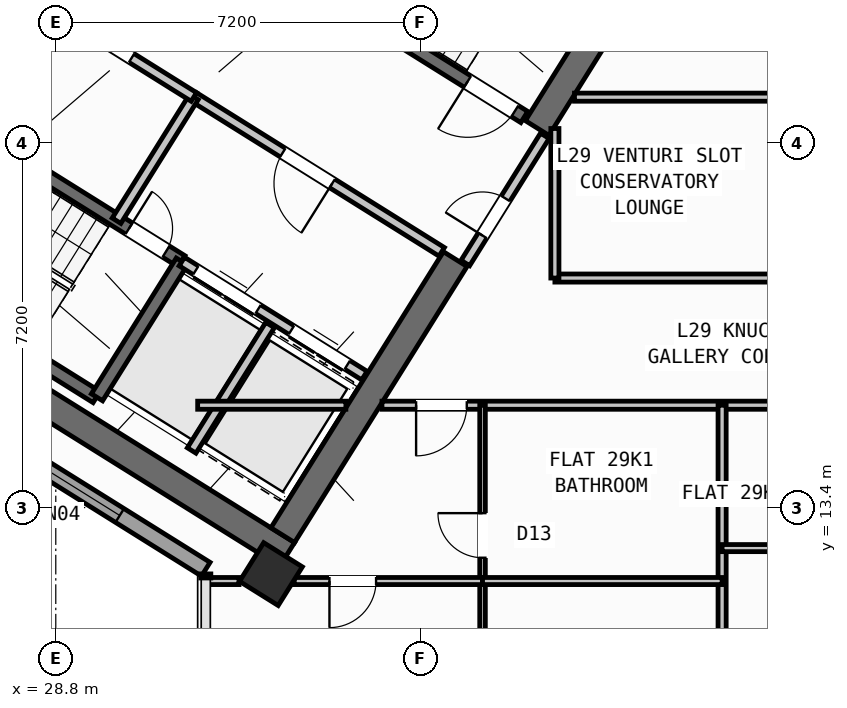
"""IFC4 building model, lengths in metres.
Left out: names, types, materials, properties, quantities, classifications, styles, units other than length and angle.
Written with IfcOpenShell. Run it as: python <this file> out.ifc"""

import sys

from ifc_helpers import new_model, si_unit, direction, frame, frame_2d, origin, origin_2d, place, context, subcontext, project, spatial, rectangle, hollow_rectangle, extrude, source, transform, mapped, element, fill, save


model = new_model("IFC4")
c1 = context("Model", 3, precision=1e-05, world=origin(), true_north=direction((0.0, 1.0)))
c2 = subcontext(c1, "Body", "Model", "MODEL_VIEW")
j1 = project(units=[si_unit("LENGTHUNIT", "METRE"), si_unit("PLANEANGLEUNIT", "RADIAN")], contexts=[c1])
p1 = place(None, origin())
s1 = spatial("IfcSite", under=j1, at=p1, CompositionType="ELEMENT")
p2 = place(p1, origin())
s2 = spatial("IfcBuilding", under=s1, at=p2, CompositionType="ELEMENT")
p3 = place(p2, frame((0.0, 0.0, 116.1)))
s3 = spatial("IfcBuildingStorey", under=s2, at=p3, CompositionType="ELEMENT", Elevation=116.1)
p4 = place(p3, frame((33.366, 12.477, 0.0), z_axis=(0.0, 0.0, 1.0), x_axis=(-0.848047359947, 0.529920442413, 0.0)))
e1 = element("IfcWall", 1, at=p4, inside=s3, PredefinedType="SHEAR", context=c2, shape_type="SweptSolid", body=[
    extrude(rectangle(XDim=13.14, YDim=0.55, at=frame_2d((6.57, 0.0))), origin(), (0.0, 0.0, 1.0), 3.35),
])
p5 = place(p3, frame((40.194, 23.922, 0.0), z_axis=(0.0, 0.0, 1.0), x_axis=(-0.529888438328, -0.848067357541, 0.0)))
e2 = element("IfcWall", 2, at=p5, inside=s3, PredefinedType="SHEAR", context=c2, shape_type="SweptSolid", body=[
    extrude(rectangle(XDim=3.575, YDim=0.55, at=frame_2d((1.788, 0.0))), origin(), (0.0, 0.0, 1.0), 3.35),
])
p6 = place(p3, frame((36.683, 18.304, 0.0), z_axis=(0.0, 0.0, 1.0), x_axis=(-0.529896466841, -0.848062341122, 0.0)))
e3 = element("IfcWall", 3, at=p6, inside=s3, PredefinedType="SHEAR", context=c2, shape_type="SweptSolid", body=[
    extrude(rectangle(XDim=6.425, YDim=0.55, at=frame_2d((3.212, 0.0))), origin(), (0.0, 0.0, 1.0), 3.35),
])
m1 = source(origin(), c2, "Body", "SweptSolid", [
    extrude(hollow_rectangle(XDim=0.9, YDim=0.9, WallThickness=0.036, at=origin_2d()), origin(), (0.0, 0.0, 1.0), 3.6),
])
p7 = place(p3, frame((33.046, 12.087, 0.0), z_axis=(0.0, 0.0, 1.0), x_axis=(-0.848048096156, 0.529919264233, 0.0)))
e4 = element("IfcColumn", 4, at=p7, inside=s3, PredefinedType="COLUMN", context=c2, shape_type="MappedRepresentation", body=[
    mapped(m1, transform((0.0, 0.0, 0.0), scale=1.0)),
])
p8 = place(p3, frame((31.76, 12.183, 0.0), z_axis=(0.0, 0.0, 1.0), x_axis=(-0.848047074256, 0.529920899612, 0.0)))
e5 = element("IfcWall", 5, at=p8, inside=s3, PredefinedType="STANDARD", context=c2, shape_type="SweptSolid", body=[
    extrude(rectangle(XDim=30.652, YDim=0.32, at=frame_2d((15.326, 0.0))), origin(), (0.0, 0.0, 1.0), 3.35),
])
p9 = place(p8, frame((15.153, 0.0, 0.0)))
e6 = element("IfcOpeningElement", 6, at=p9, cuts=e5, PredefinedType="OPENING", context=c2, shape_type="SweptSolid", body=[
    extrude(rectangle(XDim=1.2, YDim=2.15, at=frame_2d((0.6, 1.075))), frame((0.0, 0.17, 0.0), z_axis=(0.0, -1.0, 0.0), x_axis=(1.0, 0.0, 0.0)), (0.0, 0.0, 1.0), 0.34),
])
p10 = place(p8, frame((2.002, 0.0, 0.8)))
e7 = element("IfcOpeningElement", 7, at=p10, cuts=e5, PredefinedType="OPENING", context=c2, shape_type="SweptSolid", body=[
    extrude(rectangle(XDim=2.1, YDim=1.55, at=frame_2d((1.05, 0.775))), frame((0.0, 0.17, 0.0), z_axis=(0.0, -1.0, 0.0), x_axis=(1.0, 0.0, 0.0)), (0.0, 0.0, 1.0), 0.34),
])
p11 = place(p8, frame((7.206, 0.0, 0.8)))
e8 = element("IfcOpeningElement", 8, at=p11, cuts=e5, PredefinedType="OPENING", context=c2, shape_type="SweptSolid", body=[
    extrude(rectangle(XDim=2.1, YDim=1.55, at=frame_2d((1.05, 0.775))), frame((0.0, 0.17, 0.0), z_axis=(0.0, -1.0, 0.0), x_axis=(1.0, 0.0, 0.0)), (0.0, 0.0, 1.0), 0.34),
])
p12 = place(p8, frame((12.648, 0.0, 1.0)))
e9 = element("IfcOpeningElement", 9, at=p12, cuts=e5, PredefinedType="OPENING", context=c2, shape_type="SweptSolid", body=[
    extrude(rectangle(XDim=0.9, YDim=1.25, at=frame_2d((0.45, 0.625))), frame((0.0, 0.17, 0.0), z_axis=(0.0, -1.0, 0.0), x_axis=(1.0, 0.0, 0.0)), (0.0, 0.0, 1.0), 0.34),
])
p13 = place(p8, frame((19.458, 0.0, 0.95)))
e10 = element("IfcOpeningElement", 10, at=p13, cuts=e5, PredefinedType="OPENING", context=c2, shape_type="SweptSolid", body=[
    extrude(rectangle(XDim=1.2, YDim=1.4, at=frame_2d((0.6, 0.7))), frame((0.0, 0.17, 0.0), z_axis=(0.0, -1.0, 0.0), x_axis=(1.0, 0.0, 0.0)), (0.0, 0.0, 1.0), 0.34),
])
p14 = place(p8, frame((21.858, 0.0, 0.95)))
e11 = element("IfcOpeningElement", 11, at=p14, cuts=e5, PredefinedType="OPENING", context=c2, shape_type="SweptSolid", body=[
    extrude(rectangle(XDim=1.2, YDim=1.4, at=frame_2d((0.6, 0.7))), frame((0.0, 0.17, 0.0), z_axis=(0.0, -1.0, 0.0), x_axis=(1.0, 0.0, 0.0)), (0.0, 0.0, 1.0), 0.34),
])
p15 = place(p8, frame((27.266, 0.0, 0.8)))
e12 = element("IfcOpeningElement", 12, at=p15, cuts=e5, PredefinedType="OPENING", context=c2, shape_type="SweptSolid", body=[
    extrude(rectangle(XDim=2.1, YDim=1.55, at=frame_2d((1.05, 0.775))), frame((0.0, 0.17, 0.0), z_axis=(0.0, -1.0, 0.0), x_axis=(1.0, 0.0, 0.0)), (0.0, 0.0, 1.0), 0.34),
])
p16 = place(p3, frame((29.605, 15.581, 0.0), z_axis=(0.0, 0.0, 1.0), x_axis=(-0.848036911448, 0.529937163087, 0.0)))
e13 = element("IfcWall", 13, at=p16, inside=s3, PredefinedType="SHEAR", context=c2, shape_type="SweptSolid", body=[
    extrude(rectangle(XDim=7.46, YDim=0.26, at=frame_2d((3.73, 0.0))), origin(), (0.0, 0.0, 1.0), 3.35),
])
p17 = place(p3, frame((31.28, 18.261, 0.0), z_axis=(0.0, 0.0, 1.0), x_axis=(-0.848051618787, 0.529913626805, 0.0)))
e14 = element("IfcWall", 14, at=p17, inside=s3, PredefinedType="SHEAR", context=c2, shape_type="SweptSolid", body=[
    extrude(rectangle(XDim=7.46, YDim=0.26, at=frame_2d((3.73, 0.0))), origin(), (0.0, 0.0, 1.0), 3.35),
])
p18 = place(p17, frame((0.36, 0.0, 0.0)))
e15 = element("IfcOpeningElement", 15, at=p18, cuts=e14, PredefinedType="OPENING", context=c2, shape_type="SweptSolid", body=[
    extrude(rectangle(XDim=0.86, YDim=2.05, at=frame_2d((0.43, 1.025))), frame((0.0, 0.14, 0.0), z_axis=(0.0, -1.0, 0.0), x_axis=(1.0, 0.0, 0.0)), (0.0, 0.0, 1.0), 0.28),
])
p19 = place(p3, frame((31.288, 18.256, 0.0), z_axis=(0.0, 0.0, 1.0), x_axis=(-0.529943379326, -0.848033026897, 0.0)))
e16 = element("IfcWall", 16, at=p19, inside=s3, PredefinedType="SHEAR", context=c2, shape_type="SweptSolid", body=[
    extrude(rectangle(XDim=3.16, YDim=0.26, at=frame_2d((1.58, 0.0))), origin(), (0.0, 0.0, 1.0), 3.35),
])
p20 = place(p3, frame((38.046, 21.108, 0.0), z_axis=(0.0, 0.0, 1.0), x_axis=(-0.848054434086, 0.529909121291, 0.0)))
e17 = element("IfcWall", 17, at=p20, inside=s3, PredefinedType="SHEAR", context=c2, shape_type="SweptSolid", body=[
    extrude(rectangle(XDim=7.33, YDim=0.26, at=frame_2d((3.665, 0.0))), origin(), (0.0, 0.0, 1.0), 3.35),
])
p21 = place(p20, frame((0.22, 0.0, 0.0)))
e18 = element("IfcOpeningElement", 18, at=p21, cuts=e17, PredefinedType="OPENING", context=c2, shape_type="SweptSolid", body=[
    extrude(rectangle(XDim=1.1, YDim=2.1, at=frame_2d((0.55, 1.05))), frame((0.0, 0.14, 0.0), z_axis=(0.0, -1.0, 0.0), x_axis=(1.0, 0.0, 0.0)), (0.0, 0.0, 1.0), 0.28),
])
p22 = place(p3, frame((34.891, 16.005, 0.0), z_axis=(0.0, 0.0, 1.0), x_axis=(-0.848062873452, 0.529895614884, 0.0)))
e19 = element("IfcWall", 19, at=p22, inside=s3, PredefinedType="STANDARD", context=c2, shape_type="SweptSolid", body=[
    extrude(rectangle(XDim=4.248, YDim=0.2, at=frame_2d((2.124, 0.0))), origin(), (0.0, 0.0, 1.0), 3.34),
])
p23 = place(p22, frame((0.398, 0.0, 0.0)))
e20 = element("IfcOpeningElement", 20, at=p23, cuts=e19, PredefinedType="OPENING", context=c2, shape_type="SweptSolid", body=[
    extrude(rectangle(XDim=1.3, YDim=2.2, at=frame_2d((0.65, 1.1))), frame((0.0, 0.11, 0.0), z_axis=(0.0, -1.0, 0.0), x_axis=(1.0, 0.0, 0.0)), (0.0, 0.0, 1.0), 0.22),
])
p24 = place(p22, frame((2.473, 0.0, 0.0)))
e21 = element("IfcOpeningElement", 21, at=p24, cuts=e19, PredefinedType="OPENING", context=c2, shape_type="SweptSolid", body=[
    extrude(rectangle(XDim=1.45, YDim=2.25, at=frame_2d((0.725, 1.125))), frame((0.0, 0.11, 0.0), z_axis=(0.0, -1.0, 0.0), x_axis=(1.0, 0.0, 0.0)), (0.0, 0.0, 1.0), 0.22),
])
p25 = place(p3, frame((36.417, 18.447, 0.0), z_axis=(0.0, 0.0, 1.0), x_axis=(-0.848064879198, 0.529892404805, 0.0)))
e22 = element("IfcWall", 22, at=p25, inside=s3, PredefinedType="STANDARD", context=c2, shape_type="SweptSolid", body=[
    extrude(rectangle(XDim=5.768, YDim=0.2, at=frame_2d((2.884, 0.0))), origin(), (0.0, 0.0, 1.0), 3.34),
])
p26 = place(p25, frame((2.548, 0.0, 0.0)))
e23 = element("IfcOpeningElement", 23, at=p26, cuts=e22, PredefinedType="OPENING", context=c2, shape_type="SweptSolid", body=[
    extrude(rectangle(XDim=1.15, YDim=2.1, at=frame_2d((0.575, 1.05))), frame((0.0, 0.11, 0.0), z_axis=(0.0, -1.0, 0.0), x_axis=(1.0, 0.0, 0.0)), (0.0, 0.0, 1.0), 0.22),
])
p27 = place(p3, frame((33.029, 17.003, 0.0), z_axis=(0.0, 0.0, 1.0), x_axis=(-0.529916267533, -0.848049968695, 0.0)))
e24 = element("IfcWall", 24, at=p27, inside=s3, PredefinedType="STANDARD", context=c2, shape_type="SweptSolid", body=[
    extrude(rectangle(XDim=2.92, YDim=0.2, at=frame_2d((1.46, 0.0))), origin(), (0.0, 0.0, 1.0), 3.34),
])
for number, where, z_axis, x_axis in (
    (25, (31.525, 21.504, 0.0), (0.0, 0.0, 1.0), (-0.53, -0.848, 0.0)),
    (26, (28.71, 23.263, 0.0), (0.0, 0.0, 1.0), (-0.53, -0.848, 0.0)),
):
    element("IfcWall", number, at=place(p3, frame(where, z_axis=z_axis, x_axis=x_axis)), inside=s3, PredefinedType="STANDARD", context=c2, shape_type="SweptSolid", body=[
        extrude(rectangle(XDim=2.88, YDim=0.2, at=frame_2d((1.44, 0.0))), origin(), (0.0, 0.0, 1.0), 3.34),
    ])
p28 = place(p3, frame((31.525, 21.504, 0.0), z_axis=(0.0, 0.0, 1.0), x_axis=(-0.848040211232, 0.529931882541, 0.0)))
e27 = element("IfcWall", 27, at=p28, inside=s3, PredefinedType="STANDARD", context=c2, shape_type="SweptSolid", body=[
    extrude(rectangle(XDim=6.218, YDim=0.2, at=frame_2d((3.109, 0.0))), origin(), (0.0, 0.0, 1.0), 3.34),
])
p29 = place(p28, frame((4.4, 0.0, 0.0)))
e28 = element("IfcOpeningElement", 28, at=p29, cuts=e27, PredefinedType="OPENING", context=c2, shape_type="SweptSolid", body=[
    extrude(rectangle(XDim=0.86, YDim=2.05, at=frame_2d((0.43, 1.025))), frame((0.0, 0.11, 0.0), z_axis=(0.0, -1.0, 0.0), x_axis=(1.0, 0.0, 0.0)), (0.0, 0.0, 1.0), 0.22),
])
p30 = place(p28, frame((1.45, 0.0, 0.0)))
e29 = element("IfcOpeningElement", 29, at=p30, cuts=e27, PredefinedType="OPENING", context=c2, shape_type="SweptSolid", body=[
    extrude(rectangle(XDim=0.86, YDim=2.05, at=frame_2d((0.43, 1.025))), frame((0.0, 0.11, 0.0), z_axis=(0.0, -1.0, 0.0), x_axis=(1.0, 0.0, 0.0)), (0.0, 0.0, 1.0), 0.22),
])
p31 = place(p3, frame((38.451, 20.737, 0.0), z_axis=(0.0, 0.0, 1.0), x_axis=(-0.529924799939, -0.848044637038, 0.0)))
e30 = element("IfcWall", 30, at=p31, inside=s3, PredefinedType="STANDARD", context=c2, shape_type="SweptSolid", body=[
    extrude(rectangle(XDim=2.96, YDim=0.2, at=frame_2d((1.48, 0.0))), origin(), (0.0, 0.0, 1.0), 3.34),
])
p32 = place(p31, frame((1.46, 0.0, 0.0)))
e31 = element("IfcOpeningElement", 31, at=p32, cuts=e30, PredefinedType="OPENING", context=c2, shape_type="SweptSolid", body=[
    extrude(rectangle(XDim=0.86, YDim=2.05, at=frame_2d((0.43, 1.025))), frame((0.0, 0.11, 0.0), z_axis=(0.0, -1.0, 0.0), x_axis=(1.0, 0.0, 0.0)), (0.0, 0.0, 1.0), 0.22),
])
p33 = place(p3, frame((31.6, 15.42, 0.0), z_axis=(0.0, 0.0, 1.0), x_axis=(1.0, 0.0, 0.0)))
e32 = element("IfcWall", 32, at=p33, inside=s3, PredefinedType="PARTITIONING", context=c2, shape_type="SweptSolid", body=[
    extrude(rectangle(XDim=2.925, YDim=0.16, at=frame_2d((1.462, 0.0))), origin(), (0.0, 0.0, 1.0), 3.34),
])
p34 = place(p3, frame((35.237, 15.42, 0.0), z_axis=(0.0, 0.0, 1.0), x_axis=(1.0, 0.0, 0.0)))
e33 = element("IfcWall", 33, at=p34, inside=s3, PredefinedType="PARTITIONING", context=c2, shape_type="SweptSolid", body=[
    extrude(rectangle(XDim=15.432, YDim=0.16, at=frame_2d((7.716, 0.0))), origin(), (0.0, 0.0, 1.0), 3.34),
])
p35 = place(p34, frame((0.674, 0.0, 0.0)))
e34 = element("IfcOpeningElement", 34, at=p35, cuts=e33, PredefinedType="OPENING", context=c2, shape_type="SweptSolid", body=[
    extrude(rectangle(XDim=1.0, YDim=2.1, at=frame_2d((0.5, 1.05))), frame((0.0, 0.09, 0.0), z_axis=(0.0, -1.0, 0.0), x_axis=(1.0, 0.0, 0.0)), (0.0, 0.0, 1.0), 0.18),
])
p36 = place(p34, frame((9.094, 0.0, 0.0)))
e35 = element("IfcOpeningElement", 35, at=p36, cuts=e33, PredefinedType="OPENING", context=c2, shape_type="SweptSolid", body=[
    extrude(rectangle(XDim=1.0, YDim=2.1, at=frame_2d((0.5, 1.05))), frame((0.0, 0.09, 0.0), z_axis=(0.0, -1.0, 0.0), x_axis=(1.0, 0.0, 0.0)), (0.0, 0.0, 1.0), 0.18),
])
p37 = place(p3, frame((38.65, 17.93, 0.0), z_axis=(0.0, 0.0, 1.0), x_axis=(1.0, 0.0, 0.0)))
e36 = element("IfcWall", 36, at=p37, inside=s3, PredefinedType="PARTITIONING", context=c2, shape_type="SweptSolid", body=[
    extrude(rectangle(XDim=9.95, YDim=0.16, at=frame_2d((4.975, 0.0))), origin(), (0.0, 0.0, 1.0), 3.34),
])
p38 = place(p37, frame((4.475, 0.0, 0.0)))
e37 = element("IfcOpeningElement", 37, at=p38, cuts=e36, PredefinedType="OPENING", context=c2, shape_type="SweptSolid", body=[
    extrude(rectangle(XDim=1.0, YDim=2.1, at=frame_2d((0.5, 1.05))), frame((0.0, 0.09, 0.0), z_axis=(0.0, -1.0, 0.0), x_axis=(1.0, 0.0, 0.0)), (0.0, 0.0, 1.0), 0.18),
])
p39 = place(p3, frame((38.65, 17.93, 0.0), z_axis=(0.0, 0.0, 1.0), x_axis=(0.0, 1.0, 0.0)))
e38 = element("IfcWall", 38, at=p39, inside=s3, PredefinedType="PARTITIONING", context=c2, shape_type="SweptSolid", body=[
    extrude(rectangle(XDim=2.951, YDim=0.16, at=frame_2d((1.476, 0.0))), origin(), (0.0, 0.0, 1.0), 3.34),
])
p40 = place(p3, frame((39.037, 21.5, 0.0), z_axis=(0.0, 0.0, 1.0), x_axis=(1.0, 0.0, 0.0)))
e39 = element("IfcWall", 39, at=p40, inside=s3, PredefinedType="PARTITIONING", context=c2, shape_type="SweptSolid", body=[
    extrude(rectangle(XDim=7.215, YDim=0.16, at=frame_2d((3.607, 0.0))), origin(), (0.0, 0.0, 1.0), 3.34),
])
p41 = place(p3, frame((41.95, 1.96, 0.0), z_axis=(0.0, 0.0, 1.0), x_axis=(0.0, 1.0, 0.0)))
e40 = element("IfcWall", 40, at=p41, inside=s3, PredefinedType="PARTITIONING", context=c2, shape_type="SweptSolid", body=[
    extrude(rectangle(XDim=13.46, YDim=0.16, at=frame_2d((6.73, 0.0))), origin(), (0.0, 0.0, 1.0), 3.34),
])
p42 = place(p3, frame((37.222, 1.96, 0.0), z_axis=(0.0, 0.0, 1.0), x_axis=(0.0, 1.0, 0.0)))
e41 = element("IfcWall", 41, at=p42, inside=s3, PredefinedType="PARTITIONING", context=c2, shape_type="SweptSolid", body=[
    extrude(rectangle(XDim=13.46, YDim=0.11, at=frame_2d((6.73, 0.0))), origin(), (0.0, 0.0, 1.0), 3.34),
])
p43 = place(p42, frame((5.2, 0.0, 0.0)))
e42 = element("IfcOpeningElement", 42, at=p43, cuts=e41, PredefinedType="OPENING", context=c2, shape_type="SweptSolid", body=[
    extrude(rectangle(XDim=0.92, YDim=2.08, at=frame_2d((0.46, 1.04))), frame((0.0, 0.065, 0.0), z_axis=(0.0, -1.0, 0.0), x_axis=(1.0, 0.0, 0.0)), (0.0, 0.0, 1.0), 0.13),
])
p44 = place(p42, frame((10.45, 0.0, 0.0)))
e43 = element("IfcOpeningElement", 43, at=p44, cuts=e41, PredefinedType="OPENING", context=c2, shape_type="SweptSolid", body=[
    extrude(rectangle(XDim=0.88, YDim=2.08, at=frame_2d((0.44, 1.04))), frame((0.0, 0.065, 0.0), z_axis=(0.0, -1.0, 0.0), x_axis=(1.0, 0.0, 0.0)), (0.0, 0.0, 1.0), 0.13),
])
p45 = place(p3, frame((31.74, 11.95, 0.0), z_axis=(0.0, 0.0, 1.0), x_axis=(1.0, 0.0, 0.0)))
e44 = element("IfcWall", 44, at=p45, inside=s3, PredefinedType="PLUMBINGWALL", context=c2, shape_type="SweptSolid", body=[
    extrude(rectangle(XDim=0.676, YDim=0.14, at=frame_2d((0.338, 0.0))), origin(), (0.0, 0.0, 1.0), 3.34),
])
p46 = place(p3, frame((33.505, 11.95, 0.0), z_axis=(0.0, 0.0, 1.0), x_axis=(1.0, 0.0, 0.0)))
e45 = element("IfcWall", 45, at=p46, inside=s3, PredefinedType="PLUMBINGWALL", context=c2, shape_type="SweptSolid", body=[
    extrude(rectangle(XDim=3.717, YDim=0.14, at=frame_2d((1.858, 0.0))), origin(), (0.0, 0.0, 1.0), 2.525),
])
p47 = place(p46, frame((0.696, 0.0, 0.0)))
e46 = element("IfcOpeningElement", 46, at=p47, cuts=e45, PredefinedType="OPENING", context=c2, shape_type="SweptSolid", body=[
    extrude(rectangle(XDim=0.92, YDim=2.08, at=frame_2d((0.46, 1.04))), frame((0.0, 0.08, 0.0), z_axis=(0.0, -1.0, 0.0), x_axis=(1.0, 0.0, 0.0)), (0.0, 0.0, 1.0), 0.16),
])
p48 = place(p3, frame((37.222, 11.95, 0.0), z_axis=(0.0, 0.0, 1.0), x_axis=(1.0, 0.0, 0.0)))
e47 = element("IfcWall", 47, at=p48, inside=s3, PredefinedType="PLUMBINGWALL", context=c2, shape_type="SweptSolid", body=[
    extrude(rectangle(XDim=4.728, YDim=0.14, at=frame_2d((2.364, 0.0))), origin(), (0.0, 0.0, 1.0), 2.525),
])
p49 = place(p3, frame((41.95, 12.6, 0.0), z_axis=(0.0, 0.0, 1.0), x_axis=(1.0, 0.0, 0.0)))
e48 = element("IfcWall", 48, at=p49, inside=s3, PredefinedType="PLUMBINGWALL", context=c2, shape_type="SweptSolid", body=[
    extrude(rectangle(XDim=5.713, YDim=0.14, at=frame_2d((2.856, 0.0))), origin(), (0.0, 0.0, 1.0), 2.525),
])
p50 = place(p49, frame((2.396, 0.0, 0.0)))
e49 = element("IfcOpeningElement", 49, at=p50, cuts=e48, PredefinedType="OPENING", context=c2, shape_type="SweptSolid", body=[
    extrude(rectangle(XDim=0.92, YDim=2.08, at=frame_2d((0.46, 1.04))), frame((0.0, 0.08, 0.0), z_axis=(0.0, -1.0, 0.0), x_axis=(1.0, 0.0, 0.0)), (0.0, 0.0, 1.0), 0.16),
])
m2 = source(origin(), c2, "Body", "SweptSolid", [
    extrude(rectangle(XDim=2.1, YDim=1.55, at=frame_2d((1.05, 0.775))), frame((0.0, 0.03, 0.0), z_axis=(0.0, -1.0, 0.0), x_axis=(1.0, 0.0, 0.0)), (0.0, 0.0, 1.0), 0.06),
])
p51 = place(p10, origin())
e50 = element("IfcWindow", 50, at=p51, inside=s3, PartitioningType="SINGLE_PANEL", PredefinedType="WINDOW", context=c2, shape_type="MappedRepresentation", body=[
    mapped(m2, transform((0.0, 0.0, 0.0), scale=1.0)),
])
fill(e7, e50)
m3 = source(origin(), c2, "Body", "SweptSolid", [
    extrude(rectangle(XDim=0.86, YDim=2.05, at=frame_2d((0.43, 1.025))), frame((0.0, 0.025, 0.0), z_axis=(0.0, -1.0, 0.0), x_axis=(1.0, 0.0, 0.0)), (0.0, 0.0, 1.0), 0.05),
])
p52 = place(p18, frame((0.86, 0.0, 0.0), z_axis=(0.0, 0.0, 1.0), x_axis=(-1.0, 0.0, 0.0)))
e51 = element("IfcDoor", 51, at=p52, inside=s3, OperationType="SINGLE_SWING_LEFT", PredefinedType="DOOR", context=c2, shape_type="MappedRepresentation", body=[
    mapped(m3, transform((0.0, 0.0, 0.0), scale=1.0)),
])
fill(e15, e51)
m4 = source(origin(), c2, "Body", "SweptSolid", [
    extrude(rectangle(XDim=1.1, YDim=2.1, at=frame_2d((0.55, 1.05))), frame((0.0, 0.025, 0.0), z_axis=(0.0, -1.0, 0.0), x_axis=(1.0, 0.0, 0.0)), (0.0, 0.0, 1.0), 0.05),
])
p53 = place(p21, origin())
e52 = element("IfcDoor", 52, at=p53, inside=s3, OperationType="SINGLE_SWING_RIGHT", PredefinedType="DOOR", context=c2, shape_type="MappedRepresentation", body=[
    mapped(m4, transform((0.0, 0.0, 0.0), scale=1.0)),
])
fill(e18, e52)
m5 = source(origin(), c2, "Body", "SweptSolid", [
    extrude(rectangle(XDim=1.15, YDim=2.1, at=frame_2d((0.575, 1.05))), frame((0.0, 0.025, 0.0), z_axis=(0.0, -1.0, 0.0), x_axis=(1.0, 0.0, 0.0)), (0.0, 0.0, 1.0), 0.05),
])
p54 = place(p26, origin())
e53 = element("IfcDoor", 53, at=p54, inside=s3, OperationType="SINGLE_SWING_LEFT", PredefinedType="DOOR", context=c2, shape_type="MappedRepresentation", body=[
    mapped(m5, transform((0.0, 0.0, 0.0), scale=1.0)),
])
fill(e23, e53)
m6 = source(origin(), c2, "Body", "SweptSolid", [
    extrude(rectangle(XDim=1.3, YDim=2.2, at=frame_2d((0.65, 1.1))), frame((0.0, 0.025, 0.0), z_axis=(0.0, -1.0, 0.0), x_axis=(1.0, 0.0, 0.0)), (0.0, 0.0, 1.0), 0.05),
])
p55 = place(p23, origin())
e54 = element("IfcDoor", 54, at=p55, inside=s3, OperationType="DOUBLE_DOOR_SLIDING", PredefinedType="DOOR", context=c2, shape_type="MappedRepresentation", body=[
    mapped(m6, transform((0.0, 0.0, 0.0), scale=1.0)),
])
fill(e20, e54)
m7 = source(origin(), c2, "Body", "SweptSolid", [
    extrude(rectangle(XDim=1.45, YDim=2.25, at=frame_2d((0.725, 1.125))), frame((0.0, 0.025, 0.0), z_axis=(0.0, -1.0, 0.0), x_axis=(1.0, 0.0, 0.0)), (0.0, 0.0, 1.0), 0.05),
])
p56 = place(p24, origin())
e55 = element("IfcDoor", 55, at=p56, inside=s3, OperationType="DOUBLE_DOOR_SLIDING", PredefinedType="DOOR", context=c2, shape_type="MappedRepresentation", body=[
    mapped(m7, transform((0.0, 0.0, 0.0), scale=1.0)),
])
fill(e21, e55)
p57 = place(p30, frame((0.86, 0.0, 0.0), z_axis=(0.0, 0.0, 1.0), x_axis=(-1.0, 0.0, 0.0)))
e56 = element("IfcDoor", 56, at=p57, inside=s3, OperationType="SINGLE_SWING_LEFT", PredefinedType="DOOR", context=c2, shape_type="MappedRepresentation", body=[
    mapped(m3, transform((0.0, 0.0, 0.0), scale=1.0)),
])
fill(e29, e56)
p58 = place(p32, frame((0.86, 0.0, 0.0), z_axis=(0.0, 0.0, 1.0), x_axis=(-1.0, 0.0, 0.0)))
e57 = element("IfcDoor", 57, at=p58, inside=s3, OperationType="SINGLE_SWING_LEFT", PredefinedType="DOOR", context=c2, shape_type="MappedRepresentation", body=[
    mapped(m3, transform((0.0, 0.0, 0.0), scale=1.0)),
])
fill(e31, e57)
m8 = source(origin(), c2, "Body", "SweptSolid", [
    extrude(rectangle(XDim=1.0, YDim=2.1, at=frame_2d((0.5, 1.05))), frame((0.0, 0.025, 0.0), z_axis=(0.0, -1.0, 0.0), x_axis=(1.0, 0.0, 0.0)), (0.0, 0.0, 1.0), 0.05),
])
p59 = place(p35, frame((1.0, 0.0, 0.0), z_axis=(0.0, 0.0, 1.0), x_axis=(-1.0, 0.0, 0.0)))
e58 = element("IfcDoor", 58, at=p59, inside=s3, OperationType="SINGLE_SWING_RIGHT", PredefinedType="DOOR", context=c2, shape_type="MappedRepresentation", body=[
    mapped(m8, transform((0.0, 0.0, 0.0), scale=1.0)),
])
fill(e34, e58)
m9 = source(origin(), c2, "Body", "SweptSolid", [
    extrude(rectangle(XDim=0.92, YDim=2.08, at=frame_2d((0.46, 1.04))), frame((0.0, 0.025, 0.0), z_axis=(0.0, -1.0, 0.0), x_axis=(1.0, 0.0, 0.0)), (0.0, 0.0, 1.0), 0.05),
])
p60 = place(p47, frame((0.92, 0.0, 0.0), z_axis=(0.0, 0.0, 1.0), x_axis=(-1.0, 0.0, 0.0)))
e59 = element("IfcDoor", 59, at=p60, inside=s3, OperationType="SINGLE_SWING_RIGHT", PredefinedType="DOOR", context=c2, shape_type="MappedRepresentation", body=[
    mapped(m9, transform((0.0, 0.0, 0.0), scale=1.0)),
])
fill(e46, e59)
m10 = source(origin(), c2, "Body", "SweptSolid", [
    extrude(rectangle(XDim=0.88, YDim=2.08, at=frame_2d((0.44, 1.04))), frame((0.0, 0.025, 0.0), z_axis=(0.0, -1.0, 0.0), x_axis=(1.0, 0.0, 0.0)), (0.0, 0.0, 1.0), 0.05),
])
p61 = place(p44, origin())
e60 = element("IfcDoor", 60, at=p61, inside=s3, OperationType="SINGLE_SWING_RIGHT", PredefinedType="DOOR", context=c2, shape_type="MappedRepresentation", body=[
    mapped(m10, transform((0.0, 0.0, 0.0), scale=1.0)),
])
fill(e43, e60)
save(model, sys.argv[1])
